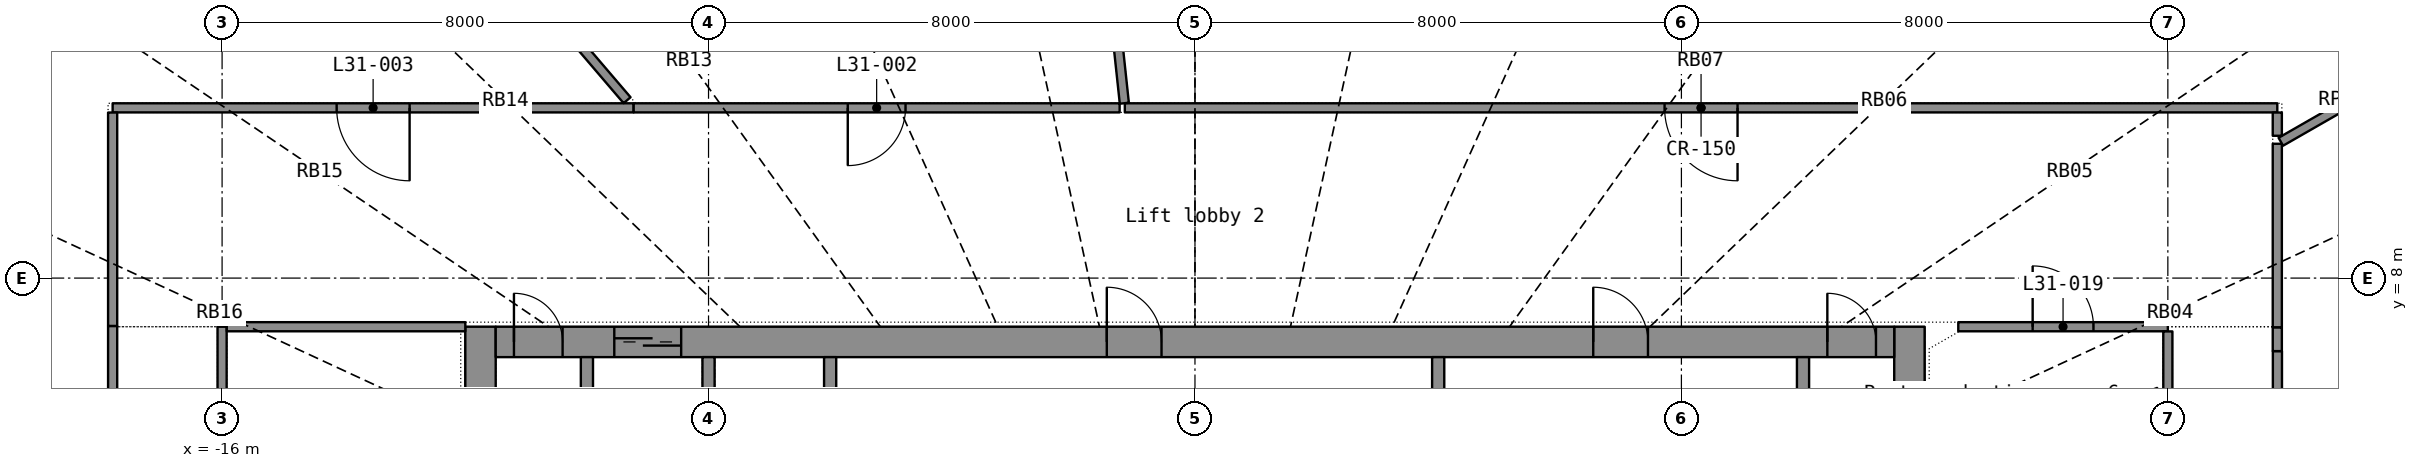
"""IFC4 building model, lengths in metres.
Left out: names, types, materials, properties, quantities, classifications, styles, units other than length and angle.
Written with IfcOpenShell. Run it as: python <this file> out.ifc"""

import sys

from ifc_helpers import new_model, si_unit, direction, frame, frame_2d, origin, place, context, subcontext, project, spatial, rectangle, extrude, element, fill, save


model = new_model("IFC4")
c1 = context("Model", 3, precision=1e-05, world=origin(), true_north=direction((0.0, 1.0)))
c2 = subcontext(c1, "Body", "Model", "MODEL_VIEW")
j1 = project(units=[si_unit("LENGTHUNIT", "METRE"), si_unit("PLANEANGLEUNIT", "RADIAN")], contexts=[c1])
p1 = place(None, origin())
s1 = spatial("IfcSite", under=j1, at=p1, CompositionType="ELEMENT")
p2 = place(p1, origin())
s2 = spatial("IfcBuilding", under=s1, at=p2, CompositionType="ELEMENT")
p3 = place(p2, frame((0.0, 0.0, 130.4)))
s3 = spatial("IfcBuildingStorey", under=s2, at=p3, CompositionType="ELEMENT", Elevation=130.4)
p4 = place(p3, frame((-11.75, -7.2, 0.0), z_axis=(0.0, 0.0, 1.0), x_axis=(0.0, 1.0, 0.0)))
e1 = element("IfcWall", 1, at=p4, inside=s3, PredefinedType="SHEAR", context=c2, shape_type="SweptSolid", body=[
    extrude(rectangle(XDim=14.4, YDim=0.5, at=frame_2d((7.2, 0.0))), origin(), (0.0, 0.0, 1.0), 3.3),
])
p5 = place(p4, frame((6.5, 0.0, 0.0)))
e2 = element("IfcOpeningElement", 2, at=p5, cuts=e1, PredefinedType="OPENING", context=c2, shape_type="SweptSolid", body=[
    extrude(rectangle(XDim=1.4, YDim=2.2, at=frame_2d((0.7, 1.1))), frame((0.0, 0.26, 0.0), z_axis=(0.0, -1.0, 0.0), x_axis=(1.0, 0.0, 0.0)), (0.0, 0.0, 1.0), 0.52),
])
p6 = place(p3, frame((11.75, -7.2, 0.0), z_axis=(0.0, 0.0, 1.0), x_axis=(0.0, 1.0, 0.0)))
e3 = element("IfcWall", 3, at=p6, inside=s3, PredefinedType="SHEAR", context=c2, shape_type="SweptSolid", body=[
    extrude(rectangle(XDim=14.4, YDim=0.5, at=frame_2d((7.2, 0.0))), origin(), (0.0, 0.0, 1.0), 3.3),
])
p7 = place(p6, frame((6.5, 0.0, 0.0)))
e4 = element("IfcOpeningElement", 4, at=p7, cuts=e3, PredefinedType="OPENING", context=c2, shape_type="SweptSolid", body=[
    extrude(rectangle(XDim=1.4, YDim=2.2, at=frame_2d((0.7, 1.1))), frame((0.0, 0.26, 0.0), z_axis=(0.0, -1.0, 0.0), x_axis=(1.0, 0.0, 0.0)), (0.0, 0.0, 1.0), 0.52),
])
p8 = place(p3, frame((-11.5, 6.95, 0.0), z_axis=(0.0, 0.0, 1.0), x_axis=(1.0, 0.0, 0.0)))
e5 = element("IfcWall", 5, at=p8, inside=s3, PredefinedType="SHEAR", context=c2, shape_type="SweptSolid", body=[
    extrude(rectangle(XDim=23.0, YDim=0.5, at=frame_2d((11.5, 0.0))), origin(), (0.0, 0.0, 1.0), 3.3),
])
p9 = place(p8, frame((1.95, 0.0, 0.0)))
e6 = element("IfcOpeningElement", 6, at=p9, cuts=e5, PredefinedType="OPENING", context=c2, shape_type="SweptSolid", body=[
    extrude(rectangle(XDim=1.1, YDim=2.2, at=frame_2d((0.55, 1.1))), frame((0.0, 0.26, 0.0), z_axis=(0.0, -1.0, 0.0), x_axis=(1.0, 0.0, 0.0)), (0.0, 0.0, 1.0), 0.52),
])
p10 = place(p8, frame((10.05, 0.0, 0.0)))
e7 = element("IfcOpeningElement", 7, at=p10, cuts=e5, PredefinedType="OPENING", context=c2, shape_type="SweptSolid", body=[
    extrude(rectangle(XDim=0.9, YDim=2.1, at=frame_2d((0.45, 1.05))), frame((0.0, 0.26, 0.0), z_axis=(0.0, -1.0, 0.0), x_axis=(1.0, 0.0, 0.0)), (0.0, 0.0, 1.0), 0.52),
])
p11 = place(p8, frame((18.05, 0.0, 0.0)))
e8 = element("IfcOpeningElement", 8, at=p11, cuts=e5, PredefinedType="OPENING", context=c2, shape_type="SweptSolid", body=[
    extrude(rectangle(XDim=0.9, YDim=2.1, at=frame_2d((0.45, 1.05))), frame((0.0, 0.26, 0.0), z_axis=(0.0, -1.0, 0.0), x_axis=(1.0, 0.0, 0.0)), (0.0, 0.0, 1.0), 0.52),
])
p12 = place(p8, frame((0.3, 0.0, 0.0)))
e9 = element("IfcOpeningElement", 9, at=p12, cuts=e5, PredefinedType="OPENING", context=c2, shape_type="SweptSolid", body=[
    extrude(rectangle(XDim=0.8, YDim=2.05, at=frame_2d((0.4, 1.025))), frame((0.0, 0.26, 0.0), z_axis=(0.0, -1.0, 0.0), x_axis=(1.0, 0.0, 0.0)), (0.0, 0.0, 1.0), 0.52),
])
p13 = place(p8, frame((21.9, 0.0, 0.0)))
e10 = element("IfcOpeningElement", 10, at=p13, cuts=e5, PredefinedType="OPENING", context=c2, shape_type="SweptSolid", body=[
    extrude(rectangle(XDim=0.8, YDim=2.05, at=frame_2d((0.4, 1.025))), frame((0.0, 0.26, 0.0), z_axis=(0.0, -1.0, 0.0), x_axis=(1.0, 0.0, 0.0)), (0.0, 0.0, 1.0), 0.52),
])
for number, where, z_axis, x_axis in (
    (11, (-10.0, 3.9, 0.0), (0.0, 0.0, 1.0), (0.0, 1.0, 0.0)),
    (12, (-8.0, 3.9, 0.0), (0.0, 0.0, 1.0), (0.0, 1.0, 0.0)),
    (13, (-6.0, 3.9, 0.0), (0.0, 0.0, 1.0), (0.0, 1.0, 0.0)),
    (14, (10.0, 3.9, 0.0), (0.0, 0.0, 1.0), (0.0, 1.0, 0.0)),
):
    element("IfcWall", number, at=place(p3, frame(where, z_axis=z_axis, x_axis=x_axis)), inside=s3, PredefinedType="SHEAR", context=c2, shape_type="SweptSolid", body=[
        extrude(rectangle(XDim=2.8, YDim=0.2, at=frame_2d((1.4, 0.0))), origin(), (0.0, 0.0, 1.0), 3.3),
    ])
p14 = place(p3, frame((4.0, 3.9, 0.0), z_axis=(0.0, 0.0, 1.0), x_axis=(0.0, 1.0, 0.0)))
e15 = element("IfcWall", 15, at=p14, inside=s3, PredefinedType="PARTITIONING", context=c2, shape_type="SweptSolid", body=[
    extrude(rectangle(XDim=2.8, YDim=0.2, at=frame_2d((1.4, 0.0))), origin(), (0.0, 0.0, 1.0), 3.3),
])
p15 = place(p3, frame((17.8, 10.8, 0.0), z_axis=(0.0, 0.0, 1.0), x_axis=(-1.0, 0.0, 0.0)))
e16 = element("IfcWall", 16, at=p15, inside=s3, PredefinedType="PARTITIONING", context=c2, shape_type="SweptSolid", body=[
    extrude(rectangle(XDim=18.954, YDim=0.15, at=frame_2d((9.477, 0.0))), origin(), (0.0, 0.0, 1.0), 2.4),
])
p16 = place(p15, frame((8.877, 0.0, 0.0)))
e17 = element("IfcOpeningElement", 17, at=p16, cuts=e16, PredefinedType="OPENING", context=c2, shape_type="SweptSolid", body=[
    extrude(rectangle(XDim=1.2, YDim=2.2, at=frame_2d((0.6, 1.1))), frame((0.0, 0.085, 0.0), z_axis=(0.0, -1.0, 0.0), x_axis=(1.0, 0.0, 0.0)), (0.0, 0.0, 1.0), 0.17),
])
p17 = place(p3, frame((17.802, -3.905, 0.0), z_axis=(0.0, 0.0, 1.0), x_axis=(0.0, 1.0, 0.0)))
e18 = element("IfcWall", 18, at=p17, inside=s3, PredefinedType="PARTITIONING", context=c2, shape_type="SweptSolid", body=[
    extrude(rectangle(XDim=10.705, YDim=0.15, at=frame_2d((5.353, 0.0))), origin(), (0.0, 0.0, 1.0), 2.4),
])
p18 = place(p17, frame((4.752, 0.0, 0.0)))
e19 = element("IfcOpeningElement", 19, at=p18, cuts=e18, PredefinedType="OPENING", context=c2, shape_type="SweptSolid", body=[
    extrude(rectangle(XDim=1.2, YDim=2.2, at=frame_2d((0.6, 1.1))), frame((0.0, 0.085, 0.0), z_axis=(0.0, -1.0, 0.0), x_axis=(1.0, 0.0, 0.0)), (0.0, 0.0, 1.0), 0.17),
])
p19 = place(p3, frame((-2.152, 20.148, 0.0), z_axis=(0.0, 0.0, 1.0), x_axis=(0.106226181, -0.994341993, 0.0)))
e20 = element("IfcWall", 20, at=p19, inside=s3, PredefinedType="PARTITIONING", context=c2, shape_type="SweptSolid", body=[
    extrude(rectangle(XDim=9.324, YDim=0.15, at=frame_2d((4.662, 0.0))), origin(), (0.0, 0.0, 1.0), 2.4),
])
p20 = place(p3, frame((-9.232, 10.8, 0.0), z_axis=(0.0, 0.0, 1.0), x_axis=(-1.0, 0.0, 0.0)))
e21 = element("IfcWall", 21, at=p20, inside=s3, PredefinedType="PARTITIONING", context=c2, shape_type="SweptSolid", body=[
    extrude(rectangle(XDim=8.568, YDim=0.15, at=frame_2d((4.284, 0.0))), origin(), (0.0, 0.0, 1.0), 2.4),
])
p21 = place(p20, frame((3.684, 0.0, 0.0)))
e22 = element("IfcOpeningElement", 22, at=p21, cuts=e21, PredefinedType="OPENING", context=c2, shape_type="SweptSolid", body=[
    extrude(rectangle(XDim=1.2, YDim=2.2, at=frame_2d((0.6, 1.1))), frame((0.0, 0.085, 0.0), z_axis=(0.0, -1.0, 0.0), x_axis=(1.0, 0.0, 0.0)), (0.0, 0.0, 1.0), 0.17),
])
p22 = place(p3, frame((-17.8, 7.212, 0.0), z_axis=(0.0, 0.0, 1.0), x_axis=(0.0, -1.0, 0.0)))
e23 = element("IfcWall", 23, at=p22, inside=s3, PredefinedType="PARTITIONING", context=c2, shape_type="SweptSolid", body=[
    extrude(rectangle(XDim=8.488, YDim=0.15, at=frame_2d((4.244, 0.0))), origin(), (0.0, 0.0, 1.0), 2.4),
])
p23 = place(p22, frame((3.644, 0.0, 0.0)))
e24 = element("IfcOpeningElement", 24, at=p23, cuts=e23, PredefinedType="OPENING", context=c2, shape_type="SweptSolid", body=[
    extrude(rectangle(XDim=1.2, YDim=2.2, at=frame_2d((0.6, 1.1))), frame((0.0, 0.085, 0.0), z_axis=(0.0, -1.0, 0.0), x_axis=(1.0, 0.0, 0.0)), (0.0, 0.0, 1.0), 0.17),
])
p24 = place(p3, frame((-1.239, 10.8, 0.0), z_axis=(0.0, 0.0, 1.0), x_axis=(-1.0, 0.0, 0.0)))
e25 = element("IfcWall", 25, at=p24, inside=s3, PredefinedType="PARTITIONING", context=c2, shape_type="SweptSolid", body=[
    extrude(rectangle(XDim=7.992, YDim=0.15, at=frame_2d((3.996, 0.0))), origin(), (0.0, 0.0, 1.0), 2.4),
])
p25 = place(p24, frame((3.521, 0.0, 0.0)))
e26 = element("IfcOpeningElement", 26, at=p25, cuts=e25, PredefinedType="OPENING", context=c2, shape_type="SweptSolid", body=[
    extrude(rectangle(XDim=0.95, YDim=2.15, at=frame_2d((0.475, 1.075))), frame((0.0, 0.085, 0.0), z_axis=(0.0, -1.0, 0.0), x_axis=(1.0, 0.0, 0.0)), (0.0, 0.0, 1.0), 0.17),
])
p26 = place(p3, frame((-14.167, 16.573, 0.0), z_axis=(0.0, 0.0, 1.0), x_axis=(0.64976247, -0.760137312, 0.0)))
e27 = element("IfcWall", 27, at=p26, inside=s3, PredefinedType="PARTITIONING", context=c2, shape_type="SweptSolid", body=[
    extrude(rectangle(XDim=7.43, YDim=0.15, at=frame_2d((3.715, 0.0))), origin(), (0.0, 0.0, 1.0), 2.4),
])
p27 = place(p3, frame((-16.0, 0.9, 0.0), z_axis=(0.0, 0.0, 1.0), x_axis=(0.0, 1.0, 0.0)))
e28 = element("IfcWall", 28, at=p27, inside=s3, PredefinedType="PARTITIONING", context=c2, shape_type="SweptSolid", body=[
    extrude(rectangle(XDim=6.3, YDim=0.15, at=frame_2d((3.15, 0.0))), origin(), (0.0, 0.0, 1.0), 2.4),
])
p28 = place(p27, frame((2.55, 0.0, 0.0)))
e29 = element("IfcOpeningElement", 29, at=p28, cuts=e28, PredefinedType="OPENING", context=c2, shape_type="SweptSolid", body=[
    extrude(rectangle(XDim=1.2, YDim=2.2, at=frame_2d((0.6, 1.1))), frame((0.0, 0.085, 0.0), z_axis=(0.0, -1.0, 0.0), x_axis=(1.0, 0.0, 0.0)), (0.0, 0.0, 1.0), 0.17),
])
p29 = place(p3, frame((-15.923, 7.2, 0.0), z_axis=(0.0, 0.0, 1.0), x_axis=(1.0, 0.0, 0.0)))
e30 = element("IfcWall", 30, at=p29, inside=s3, PredefinedType="PARTITIONING", context=c2, shape_type="SweptSolid", body=[
    extrude(rectangle(XDim=3.923, YDim=0.15, at=frame_2d((1.961, 0.0))), origin(), (0.0, 0.0, 1.0), 2.4),
])
p30 = place(p3, frame((-17.8, 10.723, 0.0), z_axis=(0.0, 0.0, 1.0), x_axis=(0.0, -1.0, 0.0)))
e31 = element("IfcWall", 31, at=p30, inside=s3, PredefinedType="PARTITIONING", context=c2, shape_type="SweptSolid", body=[
    extrude(rectangle(XDim=3.51, YDim=0.15, at=frame_2d((1.755, 0.0))), origin(), (0.0, 0.0, 1.0), 2.4),
])
p31 = place(p3, frame((12.553, 7.2, 0.0), z_axis=(0.0, 0.0, 1.0), x_axis=(1.0, 0.0, 0.0)))
e32 = element("IfcWall", 32, at=p31, inside=s3, PredefinedType="PARTITIONING", context=c2, shape_type="SweptSolid", body=[
    extrude(rectangle(XDim=3.447, YDim=0.15, at=frame_2d((1.723, 0.0))), origin(), (0.0, 0.0, 1.0), 2.4),
])
p32 = place(p31, frame((1.223, 0.0, 0.0)))
e33 = element("IfcOpeningElement", 33, at=p32, cuts=e32, PredefinedType="OPENING", context=c2, shape_type="SweptSolid", body=[
    extrude(rectangle(XDim=1.0, YDim=2.2, at=frame_2d((0.5, 1.1))), frame((0.0, 0.085, 0.0), z_axis=(0.0, -1.0, 0.0), x_axis=(1.0, 0.0, 0.0)), (0.0, 0.0, 1.0), 0.17),
])
p33 = place(p3, frame((17.8, 7.188, 0.0), z_axis=(0.0, 0.0, 1.0), x_axis=(0.0, 1.0, 0.0)))
e34 = element("IfcWall", 34, at=p33, inside=s3, PredefinedType="PARTITIONING", context=c2, shape_type="SweptSolid", body=[
    extrude(rectangle(XDim=3.021, YDim=0.15, at=frame_2d((1.511, 0.0))), origin(), (0.0, 0.0, 1.0), 2.4),
])
p34 = place(p3, frame((17.858, 10.243, 0.0), z_axis=(0.0, 0.0, 1.0), x_axis=(0.867454205, 0.497517037, 0.0)))
e35 = element("IfcWall", 35, at=p34, inside=s3, PredefinedType="PARTITIONING", context=c2, shape_type="SweptSolid", body=[
    extrude(rectangle(XDim=2.746, YDim=0.15, at=frame_2d((1.373, 0.0))), origin(), (0.0, 0.0, 1.0), 2.4),
])
p35 = place(p3, frame((16.0, 7.123, 0.0), z_axis=(0.0, 0.0, 1.0), x_axis=(0.0, -1.0, 0.0)))
e36 = element("IfcWall", 36, at=p35, inside=s3, PredefinedType="PARTITIONING", context=c2, shape_type="SweptSolid", body=[
    extrude(rectangle(XDim=1.011, YDim=0.15, at=frame_2d((0.505, 0.0))), origin(), (0.0, 0.0, 1.0), 2.4),
])
p36 = place(p3, frame((17.8, 10.341, 0.0), z_axis=(0.0, 0.0, 1.0), x_axis=(0.0, 1.0, 0.0)))
e37 = element("IfcWall", 37, at=p36, inside=s3, PredefinedType="PARTITIONING", context=c2, shape_type="SweptSolid", body=[
    extrude(rectangle(XDim=0.382, YDim=0.15, at=frame_2d((0.191, 0.0))), origin(), (0.0, 0.0, 1.0), 2.4),
])
p37 = place(p3, frame((17.8, 6.799, 0.0), z_axis=(0.0, 0.0, 1.0), x_axis=(0.0, 1.0, 0.0)))
e38 = element("IfcWall", 38, at=p37, inside=s3, PredefinedType="PARTITIONING", context=c2, shape_type="SweptSolid", body=[
    extrude(rectangle(XDim=0.388, YDim=0.15, at=frame_2d((0.194, 0.0))), origin(), (0.0, 0.0, 1.0), 2.4),
])
p38 = place(p9, origin())
e39 = element("IfcDoor", 39, at=p38, inside=s3, OperationType="DOUBLE_DOOR_SLIDING", PredefinedType="DOOR", context=c2, shape_type="SweptSolid", body=[
    extrude(rectangle(XDim=1.1, YDim=2.2, at=frame_2d((0.55, 1.1))), frame((0.0, 0.025, 0.0), z_axis=(0.0, -1.0, 0.0), x_axis=(1.0, 0.0, 0.0)), (0.0, 0.0, 1.0), 0.05),
])
fill(e6, e39)
p39 = place(p10, origin())
e40 = element("IfcDoor", 40, at=p39, inside=s3, OperationType="SINGLE_SWING_LEFT", PredefinedType="DOOR", context=c2, shape_type="SweptSolid", body=[
    extrude(rectangle(XDim=0.9, YDim=2.1, at=frame_2d((0.45, 1.05))), frame((0.0, 0.025, 0.0), z_axis=(0.0, -1.0, 0.0), x_axis=(1.0, 0.0, 0.0)), (0.0, 0.0, 1.0), 0.05),
])
fill(e7, e40)
p40 = place(p11, origin())
e41 = element("IfcDoor", 41, at=p40, inside=s3, OperationType="SINGLE_SWING_LEFT", PredefinedType="DOOR", context=c2, shape_type="SweptSolid", body=[
    extrude(rectangle(XDim=0.9, YDim=2.1, at=frame_2d((0.45, 1.05))), frame((0.0, 0.025, 0.0), z_axis=(0.0, -1.0, 0.0), x_axis=(1.0, 0.0, 0.0)), (0.0, 0.0, 1.0), 0.05),
])
fill(e8, e41)
p41 = place(p12, origin())
e42 = element("IfcDoor", 42, at=p41, inside=s3, OperationType="SINGLE_SWING_LEFT", PredefinedType="DOOR", context=c2, shape_type="SweptSolid", body=[
    extrude(rectangle(XDim=0.8, YDim=2.05, at=frame_2d((0.4, 1.025))), frame((0.0, 0.025, 0.0), z_axis=(0.0, -1.0, 0.0), x_axis=(1.0, 0.0, 0.0)), (0.0, 0.0, 1.0), 0.05),
])
fill(e9, e42)
p42 = place(p13, origin())
e43 = element("IfcDoor", 43, at=p42, inside=s3, OperationType="SINGLE_SWING_LEFT", PredefinedType="DOOR", context=c2, shape_type="SweptSolid", body=[
    extrude(rectangle(XDim=0.8, YDim=2.05, at=frame_2d((0.4, 1.025))), frame((0.0, 0.025, 0.0), z_axis=(0.0, -1.0, 0.0), x_axis=(1.0, 0.0, 0.0)), (0.0, 0.0, 1.0), 0.05),
])
fill(e10, e43)
p43 = place(p16, origin())
e44 = element("IfcDoor", 44, at=p43, inside=s3, OperationType="DOUBLE_DOOR_SINGLE_SWING", PredefinedType="DOOR", context=c2, shape_type="SweptSolid", body=[
    extrude(rectangle(XDim=1.2, YDim=2.2, at=frame_2d((0.6, 1.1))), frame((0.0, 0.025, 0.0), z_axis=(0.0, -1.0, 0.0), x_axis=(1.0, 0.0, 0.0)), (0.0, 0.0, 1.0), 0.05),
])
fill(e17, e44)
p44 = place(p25, origin())
e45 = element("IfcDoor", 45, at=p44, inside=s3, OperationType="SINGLE_SWING_RIGHT", PredefinedType="DOOR", context=c2, shape_type="SweptSolid", body=[
    extrude(rectangle(XDim=0.95, YDim=2.15, at=frame_2d((0.475, 1.075))), frame((0.0, 0.025, 0.0), z_axis=(0.0, -1.0, 0.0), x_axis=(1.0, 0.0, 0.0)), (0.0, 0.0, 1.0), 0.05),
])
fill(e26, e45)
p45 = place(p21, origin())
e46 = element("IfcDoor", 46, at=p45, inside=s3, OperationType="DOUBLE_DOOR_SINGLE_SWING", PredefinedType="DOOR", context=c2, shape_type="SweptSolid", body=[
    extrude(rectangle(XDim=1.2, YDim=2.2, at=frame_2d((0.6, 1.1))), frame((0.0, 0.025, 0.0), z_axis=(0.0, -1.0, 0.0), x_axis=(1.0, 0.0, 0.0)), (0.0, 0.0, 1.0), 0.05),
])
fill(e22, e46)
p46 = place(p32, origin())
e47 = element("IfcDoor", 47, at=p46, inside=s3, OperationType="SINGLE_SWING_LEFT", PredefinedType="DOOR", context=c2, shape_type="SweptSolid", body=[
    extrude(rectangle(XDim=1.0, YDim=2.2, at=frame_2d((0.5, 1.1))), frame((0.0, 0.025, 0.0), z_axis=(0.0, -1.0, 0.0), x_axis=(1.0, 0.0, 0.0)), (0.0, 0.0, 1.0), 0.05),
])
fill(e33, e47)
save(model, sys.argv[1])
